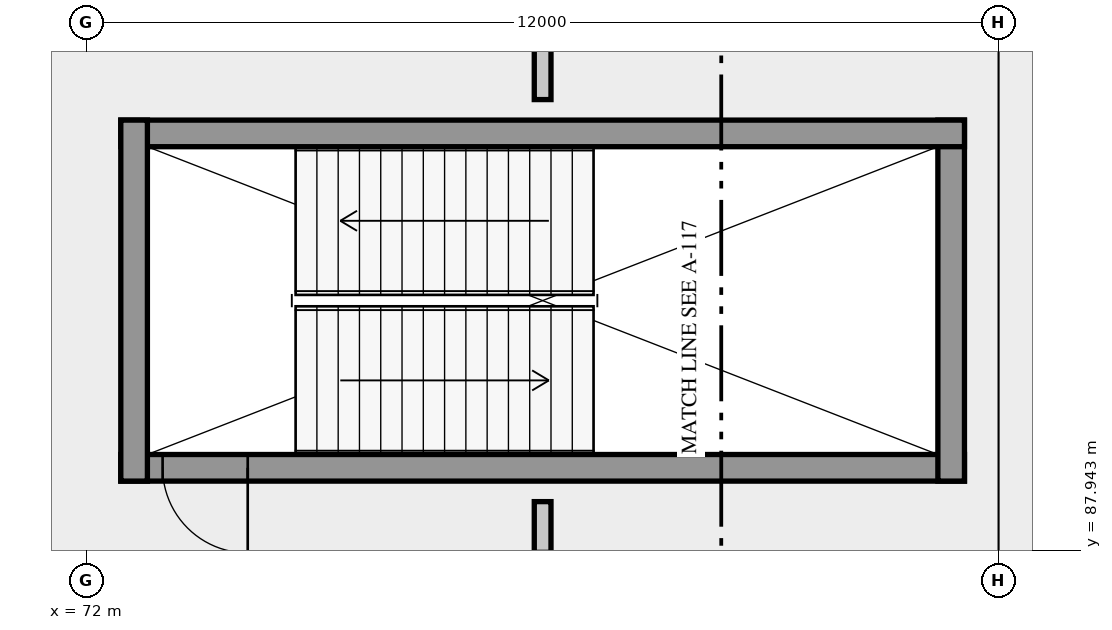
"""IFC4 building model, lengths in metres.
Left out: names, types, materials, properties, quantities, classifications, styles, units other than length and angle.
Written with IfcOpenShell. Run it as: python <this file> out.ifc"""

import sys

from ifc_helpers import new_model, si_unit, direction, frame, frame_2d, origin, place, context, subcontext, project, spatial, rectangle, extrude, element, fill, save


model = new_model("IFC4")
c1 = context("Model", 3, precision=1e-05, world=origin(), true_north=direction((0.0, 1.0)))
c2 = subcontext(c1, "Body", "Model", "MODEL_VIEW")
j1 = project(units=[si_unit("LENGTHUNIT", "METRE"), si_unit("PLANEANGLEUNIT", "RADIAN")], contexts=[c1])
p1 = place(None, origin())
s1 = spatial("IfcSite", under=j1, at=p1, CompositionType="ELEMENT")
p2 = place(p1, origin())
s2 = spatial("IfcBuilding", under=s1, at=p2, CompositionType="ELEMENT")
p3 = place(p2, origin())
s3 = spatial("IfcBuildingStorey", under=s2, at=p3, CompositionType="ELEMENT", Elevation=0.0)
p4 = place(p3, frame((72.45, 89.025, 0.0), z_axis=(0.0, 0.0, 1.0), x_axis=(1.0, 0.0, 0.0)))
e1 = element("IfcWall", 1, at=p4, inside=s3, PredefinedType="SHEAR", context=c2, shape_type="SweptSolid", body=[
    extrude(rectangle(XDim=11.1, YDim=0.35, at=frame_2d((5.55, 0.0))), origin(), (0.0, 0.0, 1.0), 5.14),
])
p5 = place(p4, frame((0.55, 0.0, 0.0)))
e2 = element("IfcOpeningElement", 2, at=p5, cuts=e1, PredefinedType="OPENING", context=c2, shape_type="SweptSolid", body=[
    extrude(rectangle(XDim=1.12, YDim=2.2, at=frame_2d((0.56, 1.1))), frame((0.0, 0.185, 0.0), z_axis=(0.0, -1.0, 0.0), x_axis=(1.0, 0.0, 0.0)), (0.0, 0.0, 1.0), 0.37),
])
p6 = place(p3, frame((83.375, 88.85, 0.0), z_axis=(0.0, 0.0, 1.0), x_axis=(0.0, 1.0, 0.0)))
e3 = element("IfcWall", 3, at=p6, inside=s3, PredefinedType="SHEAR", context=c2, shape_type="SweptSolid", body=[
    extrude(rectangle(XDim=4.75, YDim=0.35, at=frame_2d((2.375, 0.0))), origin(), (0.0, 0.0, 1.0), 5.14),
])
p7 = place(p3, frame((83.55, 93.425, 0.0), z_axis=(0.0, 0.0, 1.0), x_axis=(-1.0, 0.0, 0.0)))
e4 = element("IfcWall", 4, at=p7, inside=s3, PredefinedType="SHEAR", context=c2, shape_type="SweptSolid", body=[
    extrude(rectangle(XDim=11.1, YDim=0.35, at=frame_2d((5.55, 0.0))), origin(), (0.0, 0.0, 1.0), 5.14),
])
p8 = place(p3, frame((72.625, 93.6, 0.0), z_axis=(0.0, 0.0, 1.0), x_axis=(0.0, -1.0, 0.0)))
e5 = element("IfcWall", 5, at=p8, inside=s3, PredefinedType="SHEAR", context=c2, shape_type="SweptSolid", body=[
    extrude(rectangle(XDim=4.75, YDim=0.35, at=frame_2d((2.375, 0.0))), origin(), (0.0, 0.0, 1.0), 5.14),
])
p9 = place(p3, frame((78.0, 84.36, 0.0), z_axis=(0.0, 0.0, 1.0), x_axis=(0.0, 1.0, 0.0)))
e6 = element("IfcWall", 6, at=p9, inside=s3, PredefinedType="PARTITIONING", context=c2, shape_type="SweptSolid", body=[
    extrude(rectangle(XDim=4.22, YDim=0.22, at=frame_2d((2.11, 0.0))), origin(), (0.0, 0.0, 1.0), 5.12),
])
p10 = place(p9, frame((2.22, 0.0, 0.0)))
e7 = element("IfcOpeningElement", 7, at=p10, cuts=e6, PredefinedType="OPENING", context=c2, shape_type="SweptSolid", body=[
    extrude(rectangle(XDim=1.35, YDim=2.3, at=frame_2d((0.675, 1.15))), frame((0.0, 0.12, 0.0), z_axis=(0.0, -1.0, 0.0), x_axis=(1.0, 0.0, 0.0)), (0.0, 0.0, 1.0), 0.24),
])
p11 = place(p3, frame((78.0, 93.87, 0.0), z_axis=(0.0, 0.0, 1.0), x_axis=(0.0, 1.0, 0.0)))
e8 = element("IfcWall", 8, at=p11, inside=s3, PredefinedType="PARTITIONING", context=c2, shape_type="SweptSolid", body=[
    extrude(rectangle(XDim=1.77, YDim=0.22, at=frame_2d((0.885, 0.0))), origin(), (0.0, 0.0, 1.0), 5.12),
])
p12 = place(p5, frame((1.12, 0.0, 0.0), z_axis=(0.0, 0.0, 1.0), x_axis=(-1.0, 0.0, 0.0)))
e9 = element("IfcDoor", 9, at=p12, inside=s3, OperationType="SINGLE_SWING_RIGHT", PredefinedType="DOOR", context=c2, shape_type="SweptSolid", body=[
    extrude(rectangle(XDim=1.12, YDim=2.2, at=frame_2d((0.56, 1.1))), frame((0.0, 0.025, 0.0), z_axis=(0.0, -1.0, 0.0), x_axis=(1.0, 0.0, 0.0)), (0.0, 0.0, 1.0), 0.05),
])
fill(e2, e9)
save(model, sys.argv[1])
